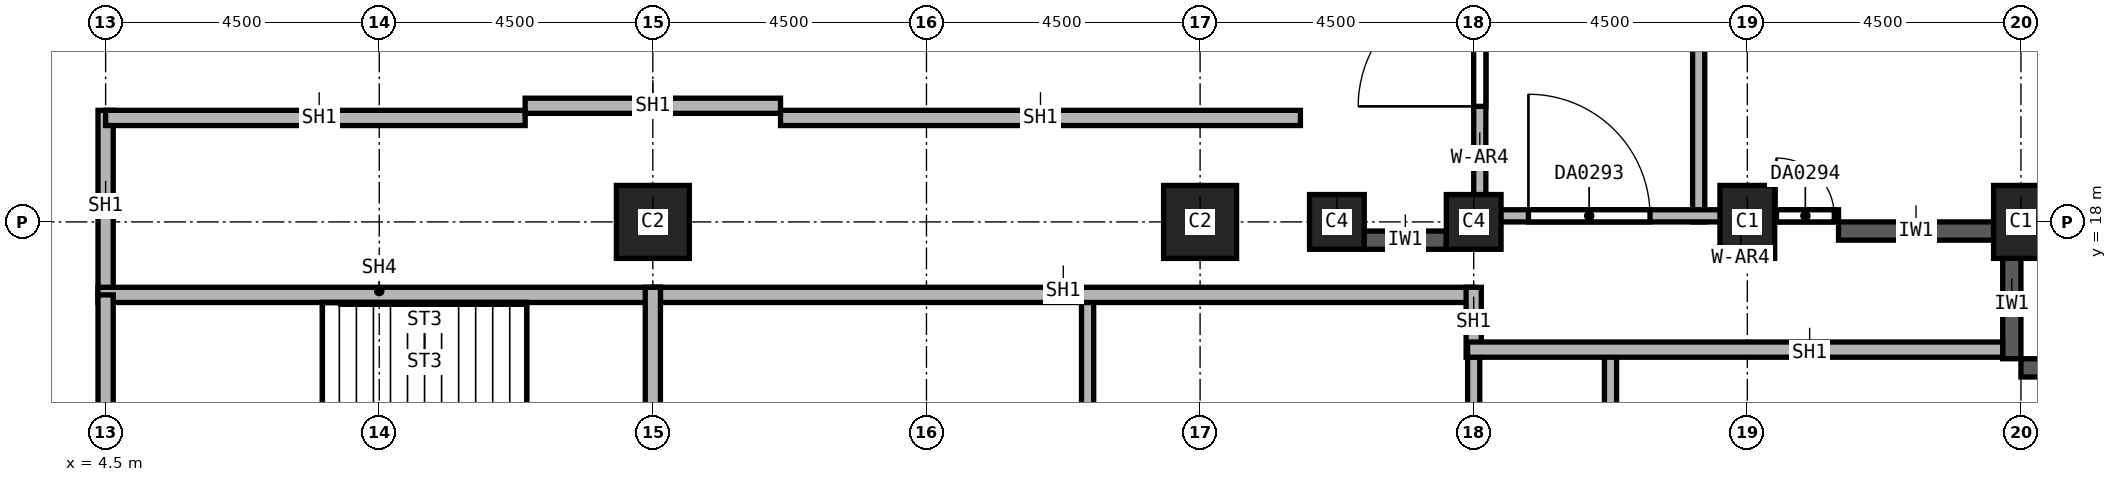
"""IFC4 building model, lengths in metres.
Left out: names, types, materials, properties, quantities, classifications, styles, units other than length and angle.
Written with IfcOpenShell. Run it as: python <this file> out.ifc"""

import sys

from ifc_helpers import new_model, si_unit, direction, frame, frame_2d, origin, origin_2d, place, context, subcontext, project, spatial, rectangle, extrude, element, fill, save


model = new_model("IFC4")
c1 = context("Model", 3, precision=1e-05, world=origin(), true_north=direction((0.0, 1.0)))
c2 = subcontext(c1, "Body", "Model", "MODEL_VIEW")
j1 = project(units=[si_unit("LENGTHUNIT", "METRE"), si_unit("PLANEANGLEUNIT", "RADIAN")], contexts=[c1])
p1 = place(None, origin())
s1 = spatial("IfcSite", under=j1, at=p1, CompositionType="ELEMENT")
p2 = place(p1, origin())
s2 = spatial("IfcBuilding", under=s1, at=p2, CompositionType="ELEMENT")
p3 = place(p2, frame((0.0, 0.0, 60.0)))
s3 = spatial("IfcBuildingStorey", under=s2, at=p3, CompositionType="ELEMENT", Elevation=60.0)
for number, where, z_axis, x_axis in (
    (1, (31.5, 18.0, 0.0), (0.0, 0.0, 1.0), (1.0, 0.0, 0.0)),
    (2, (36.0, 18.0, 0.0), (0.0, 0.0, 1.0), (1.0, 0.0, 0.0)),
):
    element("IfcColumn", number, at=place(p3, frame(where, z_axis=z_axis, x_axis=x_axis)), inside=s3, PredefinedType="COLUMN", context=c2, shape_type="SweptSolid", body=[
        extrude(rectangle(XDim=0.9, YDim=1.2, at=origin_2d()), origin(), (0.0, 0.0, 1.0), 7.7),
    ])
for number, where, z_axis, x_axis in (
    (3, (13.5, 18.0, 0.0), (0.0, 0.0, 1.0), (1.0, 0.0, 0.0)),
    (4, (22.5, 18.0, 0.0), (0.0, 0.0, 1.0), (1.0, 0.0, 0.0)),
):
    element("IfcColumn", number, at=place(p3, frame(where, z_axis=z_axis, x_axis=x_axis)), inside=s3, PredefinedType="COLUMN", context=c2, shape_type="SweptSolid", body=[
        extrude(rectangle(XDim=1.2, YDim=1.2, at=origin_2d()), origin(), (0.0, 0.0, 1.0), 7.7),
    ])
for number, where, z_axis, x_axis in (
    (5, (27.0, 18.0, 0.0), (0.0, 0.0, 1.0), (1.0, 0.0, 0.0)),
    (6, (24.75, 18.0, 0.0), (0.0, 0.0, 1.0), (1.0, 0.0, 0.0)),
):
    element("IfcColumn", number, at=place(p3, frame(where, z_axis=z_axis, x_axis=x_axis)), inside=s3, PredefinedType="COLUMN", context=c2, shape_type="SweptSolid", body=[
        extrude(rectangle(XDim=0.9, YDim=0.9, at=origin_2d()), origin(), (0.0, 0.0, 1.0), 7.7),
    ])
for number, where, z_axis, x_axis in (
    (7, (37.8, 15.6, 0.0), (0.0, 0.0, 1.0), (-1.0, 0.0, 0.0)),
    (8, (35.85, 17.55, 0.0), (0.0, 0.0, 1.0), (0.0, -1.0, 0.0)),
):
    element("IfcWall", number, at=place(p3, frame(where, z_axis=z_axis, x_axis=x_axis)), inside=s3, PredefinedType="SOLIDWALL", context=c2, shape_type="SweptSolid", body=[
        extrude(rectangle(XDim=1.8, YDim=0.3, at=frame_2d((0.9, 0.0))), origin(), (0.0, 0.0, 1.0), 7.1),
    ])
p4 = place(p3, frame((35.55, 17.85, 0.0), z_axis=(0.0, 0.0, 1.0), x_axis=(-1.0, 0.0, 0.0)))
e9 = element("IfcWall", 9, at=p4, inside=s3, PredefinedType="SOLIDWALL", context=c2, shape_type="SweptSolid", body=[
    extrude(rectangle(XDim=2.55, YDim=0.3, at=frame_2d((1.275, 0.0))), origin(), (0.0, 0.0, 1.0), 7.1),
])
p5 = place(p3, frame((26.55, 17.7, 0.0), z_axis=(0.0, 0.0, 1.0), x_axis=(-1.0, 0.0, 0.0)))
e10 = element("IfcWall", 10, at=p5, inside=s3, PredefinedType="SOLIDWALL", context=c2, shape_type="SweptSolid", body=[
    extrude(rectangle(XDim=1.35, YDim=0.3, at=frame_2d((0.675, 0.0))), origin(), (0.0, 0.0, 1.0), 7.1),
])
p6 = place(p3, frame((20.65, 16.8, 0.0), z_axis=(0.0, 0.0, 1.0), x_axis=(0.0, -1.0, 0.0)))
e11 = element("IfcWall", 11, at=p6, inside=s3, PredefinedType="PARTITIONING", context=c2, shape_type="SweptSolid", body=[
    extrude(rectangle(XDim=17.55, YDim=0.2, at=frame_2d((8.775, 0.0))), origin(), (0.0, 0.0, 1.0), 7.7),
])
p7 = place(p6, frame((13.65, 0.0, 0.0)))
e12 = element("IfcOpeningElement", 12, at=p7, cuts=e11, PredefinedType="OPENING", context=c2, shape_type="SweptSolid", body=[
    extrude(rectangle(XDim=1.0, YDim=2.1, at=frame_2d((0.5, 1.05))), frame((0.0, 0.1, 0.0), z_axis=(0.0, -1.0, 0.0), x_axis=(1.0, 0.0, 0.0)), (0.0, 0.0, 1.0), 0.2),
])
p8 = place(p6, frame((3.25, 0.0, 0.0)))
e13 = element("IfcOpeningElement", 13, at=p8, cuts=e11, PredefinedType="OPENING", context=c2, shape_type="SweptSolid", body=[
    extrude(rectangle(XDim=1.0, YDim=2.1, at=frame_2d((0.5, 1.05))), frame((0.0, 0.1, 0.0), z_axis=(0.0, -1.0, 0.0), x_axis=(1.0, 0.0, 0.0)), (0.0, 0.0, 1.0), 0.2),
])
for number, where, z_axis, x_axis in (
    (14, (27.0, 15.9, 0.0), (0.0, 0.0, 1.0), (0.0, -1.0, 0.0)),
    (15, (29.25, 15.9, 0.0), (0.0, 0.0, 1.0), (0.0, -1.0, 0.0)),
):
    element("IfcWall", number, at=place(p3, frame(where, z_axis=z_axis, x_axis=x_axis)), inside=s3, PredefinedType="PARTITIONING", context=c2, shape_type="SweptSolid", body=[
        extrude(rectangle(XDim=16.65, YDim=0.2, at=frame_2d((8.325, 0.0))), origin(), (0.0, 0.0, 1.0), 7.7),
    ])
p9 = place(p3, frame((4.5, 16.8, 0.0), z_axis=(0.0, 0.0, 1.0), x_axis=(0.0, 1.0, 0.0)))
e16 = element("IfcWall", 16, at=p9, inside=s3, PredefinedType="SOLIDWALL", context=c2, shape_type="SweptSolid", body=[
    extrude(rectangle(XDim=3.035, YDim=0.25, at=frame_2d((1.518, 0.0))), origin(), (0.0, 0.0, 1.0), 7.7),
])
p10 = place(p3, frame((4.5, 19.71, 0.0), z_axis=(0.0, 0.0, 1.0), x_axis=(1.0, 0.0, 0.0)))
e17 = element("IfcWall", 17, at=p10, inside=s3, PredefinedType="SOLIDWALL", context=c2, shape_type="SweptSolid", body=[
    extrude(rectangle(XDim=6.9, YDim=0.25, at=frame_2d((3.45, 0.0))), origin(), (0.0, 0.0, 1.0), 7.7),
])
p11 = place(p3, frame((11.4, 19.91, 0.0), z_axis=(0.0, 0.0, 1.0), x_axis=(1.0, 0.0, 0.0)))
e18 = element("IfcWall", 18, at=p11, inside=s3, PredefinedType="SOLIDWALL", context=c2, shape_type="SweptSolid", body=[
    extrude(rectangle(XDim=4.2, YDim=0.25, at=frame_2d((2.1, 0.0))), origin(), (0.0, 0.0, 1.0), 7.7),
])
p12 = place(p3, frame((27.0, 16.8, 0.0), z_axis=(0.0, 0.0, 1.0), x_axis=(-1.0, 0.0, 0.0)))
e19 = element("IfcWall", 19, at=p12, inside=s3, PredefinedType="SOLIDWALL", context=c2, shape_type="SweptSolid", body=[
    extrude(rectangle(XDim=13.5, YDim=0.25, at=frame_2d((6.75, 0.0))), origin(), (0.0, 0.0, 1.0), 7.7),
])
p13 = place(p3, frame((15.6, 19.71, 0.0), z_axis=(0.0, 0.0, 1.0), x_axis=(1.0, 0.0, 0.0)))
e20 = element("IfcWall", 20, at=p13, inside=s3, PredefinedType="SOLIDWALL", context=c2, shape_type="SweptSolid", body=[
    extrude(rectangle(XDim=8.55, YDim=0.25, at=frame_2d((4.275, 0.0))), origin(), (0.0, 0.0, 1.0), 7.7),
])
p14 = place(p3, frame((27.0, 15.775, 0.0), z_axis=(0.0, 0.0, 1.0), x_axis=(0.0, 1.0, 0.0)))
e21 = element("IfcWall", 21, at=p14, inside=s3, PredefinedType="SOLIDWALL", context=c2, shape_type="SweptSolid", body=[
    extrude(rectangle(XDim=1.15, YDim=0.25, at=frame_2d((0.575, 0.0))), origin(), (0.0, 0.0, 1.0), 7.7),
])
p15 = place(p3, frame((35.7, 15.9, 0.0), z_axis=(0.0, 0.0, 1.0), x_axis=(-1.0, 0.0, 0.0)))
e22 = element("IfcWall", 22, at=p15, inside=s3, PredefinedType="SOLIDWALL", context=c2, shape_type="SweptSolid", body=[
    extrude(rectangle(XDim=8.8, YDim=0.25, at=frame_2d((4.4, 0.0))), origin(), (0.0, 0.0, 1.0), 7.7),
])
p16 = place(p3, frame((4.375, 16.8, 0.0), z_axis=(0.0, 0.0, 1.0), x_axis=(1.0, 0.0, 0.0)))
e23 = element("IfcWall", 23, at=p16, inside=s3, PredefinedType="SOLIDWALL", context=c2, shape_type="SweptSolid", body=[
    extrude(rectangle(XDim=9.25, YDim=0.25, at=frame_2d((4.625, 0.0))), origin(), (0.0, 0.0, 1.0), 7.7),
])
p17 = place(p3, frame((4.5, 12.3, 0.0), z_axis=(0.0, 0.0, 1.0), x_axis=(0.0, 1.0, 0.0)))
e24 = element("IfcWall", 24, at=p17, inside=s3, PredefinedType="SOLIDWALL", context=c2, shape_type="SweptSolid", body=[
    extrude(rectangle(XDim=4.5, YDim=0.25, at=frame_2d((2.25, 0.0))), origin(), (0.0, 0.0, 1.0), 7.7),
])
p18 = place(p3, frame((13.5, 16.925, 0.0), z_axis=(0.0, 0.0, 1.0), x_axis=(0.0, -1.0, 0.0)))
e25 = element("IfcWall", 25, at=p18, inside=s3, PredefinedType="SOLIDWALL", context=c2, shape_type="SweptSolid", body=[
    extrude(rectangle(XDim=4.625, YDim=0.25, at=frame_2d((2.312, 0.0))), origin(), (0.0, 0.0, 1.0), 7.7),
])
p19 = place(p3, frame((27.1, 18.1, 0.0), z_axis=(0.0, 0.0, 1.0), x_axis=(0.0, 1.0, 0.0)))
e26 = element("IfcWall", 26, at=p19, inside=s3, PredefinedType="SOLIDWALL", context=c2, shape_type="SweptSolid", body=[
    extrude(rectangle(XDim=17.8, YDim=0.2, at=frame_2d((8.9, 0.0))), origin(), (0.0, 0.0, 1.0), 8.0),
])
p20 = place(p19, frame((1.8, 0.0, 0.0)))
e27 = element("IfcOpeningElement", 27, at=p20, cuts=e26, PredefinedType="OPENING", context=c2, shape_type="SweptSolid", body=[
    extrude(rectangle(XDim=2.0, YDim=2.4, at=frame_2d((1.0, 1.2))), frame((0.0, 0.1, 0.0), z_axis=(0.0, -1.0, 0.0), x_axis=(1.0, 0.0, 0.0)), (0.0, 0.0, 1.0), 0.2),
])
p21 = place(p19, frame((4.4, 0.0, 0.0)))
e28 = element("IfcOpeningElement", 28, at=p21, cuts=e26, PredefinedType="OPENING", context=c2, shape_type="SweptSolid", body=[
    extrude(rectangle(XDim=2.0, YDim=2.4, at=frame_2d((1.0, 1.2))), frame((0.0, 0.1, 0.0), z_axis=(0.0, -1.0, 0.0), x_axis=(1.0, 0.0, 0.0)), (0.0, 0.0, 1.0), 0.2),
])
p22 = place(p3, frame((30.7, 18.0, 0.0), z_axis=(0.0, 0.0, 1.0), x_axis=(0.0, 1.0, 0.0)))
e29 = element("IfcWall", 29, at=p22, inside=s3, PredefinedType="SOLIDWALL", context=c2, shape_type="SweptSolid", body=[
    extrude(rectangle(XDim=14.8, YDim=0.2, at=frame_2d((7.4, 0.0))), origin(), (0.0, 0.0, 1.0), 8.0),
])
p23 = place(p3, frame((27.0, 18.1, 0.0), z_axis=(0.0, 0.0, 1.0), x_axis=(1.0, 0.0, 0.0)))
e30 = element("IfcWall", 30, at=p23, inside=s3, PredefinedType="SOLIDWALL", context=c2, shape_type="SweptSolid", body=[
    extrude(rectangle(XDim=6.0, YDim=0.2, at=frame_2d((3.0, 0.0))), origin(), (0.0, 0.0, 1.0), 8.0),
])
p24 = place(p23, frame((0.9, 0.0, 0.0)))
e31 = element("IfcOpeningElement", 31, at=p24, cuts=e30, PredefinedType="OPENING", context=c2, shape_type="SweptSolid", body=[
    extrude(rectangle(XDim=2.0, YDim=2.4, at=frame_2d((1.0, 1.2))), frame((0.0, 0.1, 0.0), z_axis=(0.0, -1.0, 0.0), x_axis=(1.0, 0.0, 0.0)), (0.0, 0.0, 1.0), 0.2),
])
p25 = place(p23, frame((4.98, 0.0, 0.0)))
e32 = element("IfcOpeningElement", 32, at=p25, cuts=e30, PredefinedType="OPENING", context=c2, shape_type="SweptSolid", body=[
    extrude(rectangle(XDim=0.95, YDim=2.4, at=frame_2d((0.475, 1.2))), frame((0.0, 0.1, 0.0), z_axis=(0.0, -1.0, 0.0), x_axis=(1.0, 0.0, 0.0)), (0.0, 0.0, 1.0), 0.2),
])
p26 = place(p24, frame((2.0, 0.0, 0.0), z_axis=(0.0, 0.0, 1.0), x_axis=(-1.0, 0.0, 0.0)))
e33 = element("IfcDoor", 33, at=p26, inside=s3, OperationType="DOUBLE_DOOR_SINGLE_SWING", PredefinedType="DOOR", context=c2, shape_type="SweptSolid", body=[
    extrude(rectangle(XDim=2.0, YDim=2.4, at=frame_2d((1.0, 1.2))), frame((0.0, 0.025, 0.0), z_axis=(0.0, -1.0, 0.0), x_axis=(1.0, 0.0, 0.0)), (0.0, 0.0, 1.0), 0.05),
])
fill(e31, e33)
p27 = place(p25, frame((0.95, 0.0, 0.0), z_axis=(0.0, 0.0, 1.0), x_axis=(-1.0, 0.0, 0.0)))
e34 = element("IfcDoor", 34, at=p27, inside=s3, OperationType="SINGLE_SWING_LEFT", PredefinedType="DOOR", context=c2, shape_type="SweptSolid", body=[
    extrude(rectangle(XDim=0.95, YDim=2.4, at=frame_2d((0.475, 1.2))), frame((0.0, 0.025, 0.0), z_axis=(0.0, -1.0, 0.0), x_axis=(1.0, 0.0, 0.0)), (0.0, 0.0, 1.0), 0.05),
])
fill(e32, e34)
p28 = place(p20, origin())
e35 = element("IfcDoor", 35, at=p28, inside=s3, OperationType="DOUBLE_DOOR_SINGLE_SWING", PredefinedType="DOOR", context=c2, shape_type="SweptSolid", body=[
    extrude(rectangle(XDim=2.0, YDim=2.4, at=frame_2d((1.0, 1.2))), frame((0.0, 0.025, 0.0), z_axis=(0.0, -1.0, 0.0), x_axis=(1.0, 0.0, 0.0)), (0.0, 0.0, 1.0), 0.05),
])
fill(e27, e35)
save(model, sys.argv[1])
